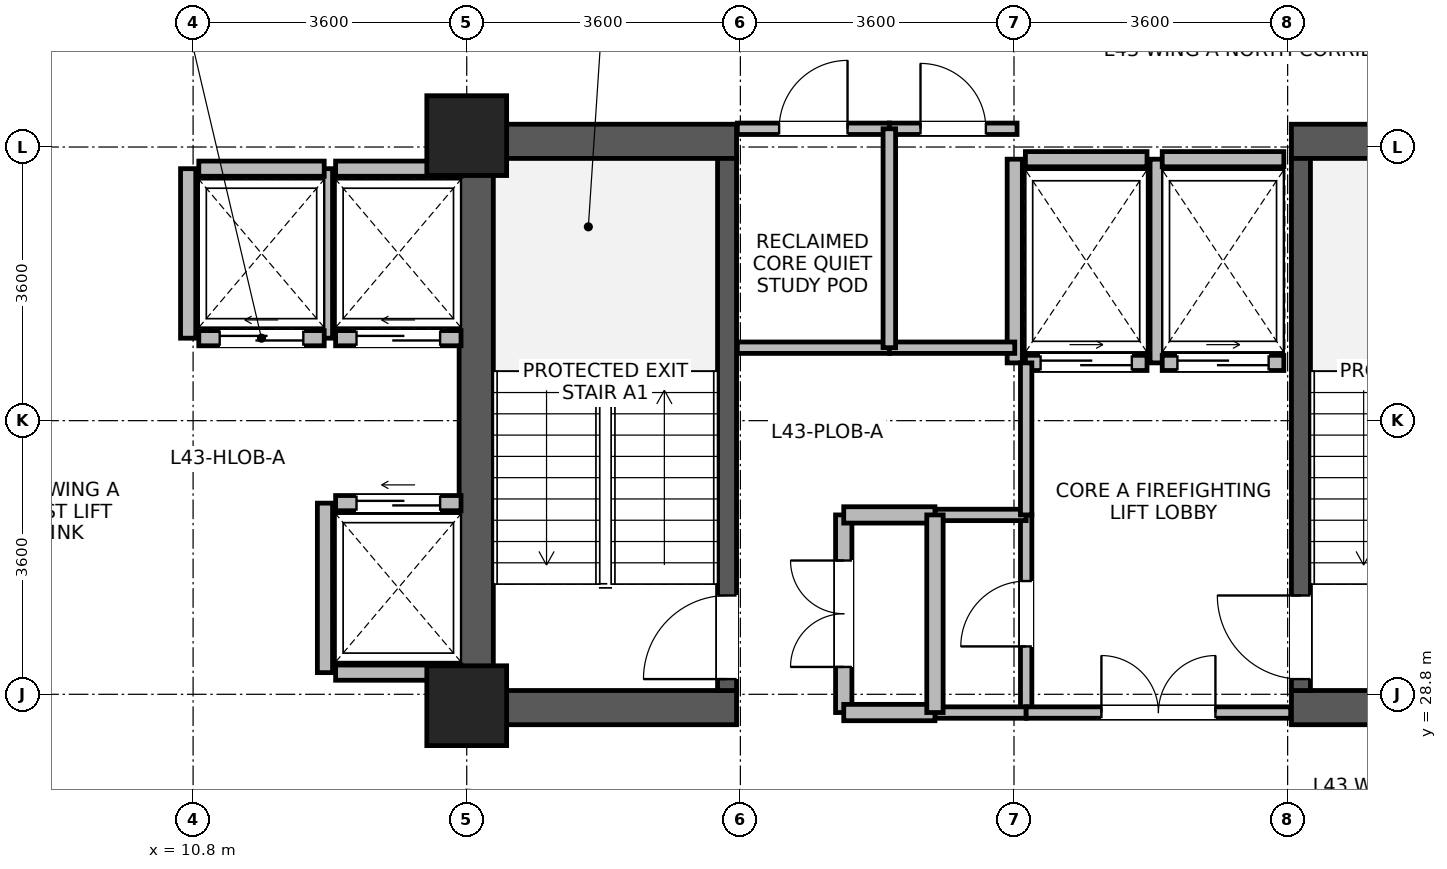
"""IFC4 building model, lengths in metres.
Left out: names, types, materials, properties, quantities, classifications, styles, units other than length and angle.
Written with IfcOpenShell. Run it as: python <this file> out.ifc"""

import sys

from ifc_helpers import new_model, si_unit, direction, frame, frame_2d, origin, origin_2d, place, context, subcontext, project, spatial, rectangle, extrude, source, transform, mapped, element, fill, save


model = new_model("IFC4")
c1 = context("Model", 3, precision=1e-05, world=origin(), true_north=direction((0.0, 1.0)))
c2 = subcontext(c1, "Body", "Model", "MODEL_VIEW")
j1 = project(units=[si_unit("LENGTHUNIT", "METRE"), si_unit("PLANEANGLEUNIT", "RADIAN")], contexts=[c1])
p1 = place(None, origin())
s1 = spatial("IfcSite", under=j1, at=p1, CompositionType="ELEMENT")
p2 = place(p1, origin())
s2 = spatial("IfcBuilding", under=s1, at=p2, CompositionType="ELEMENT")
p3 = place(p2, frame((0.0, 0.0, 169.8)))
s3 = spatial("IfcBuildingStorey", under=s2, at=p3, CompositionType="ELEMENT", Elevation=169.8)
p4 = place(p3, frame((14.525, 28.4, 0.0), z_axis=(0.0, 0.0, 1.0), x_axis=(0.0, 1.0, 0.0)))
e1 = element("IfcWall", 1, at=p4, inside=s3, PredefinedType="SHEAR", context=c2, shape_type="SweptSolid", body=[
    extrude(rectangle(XDim=7.9, YDim=0.45, at=frame_2d((3.95, 0.0))), origin(), (0.0, 0.0, 1.0), 3.46),
])
for number, where, z_axis, x_axis in (
    (2, (14.75, 28.625, 0.0), (0.0, 0.0, 1.0), (1.0, 0.0, 0.0)),
    (3, (25.25, 28.625, 0.0), (0.0, 0.0, 1.0), (1.0, 0.0, 0.0)),
    (4, (14.75, 36.075, 0.0), (0.0, 0.0, 1.0), (1.0, 0.0, 0.0)),
    (5, (25.25, 36.075, 0.0), (0.0, 0.0, 1.0), (1.0, 0.0, 0.0)),
):
    element("IfcWall", number, at=place(p3, frame(where, z_axis=z_axis, x_axis=x_axis)), inside=s3, PredefinedType="SHEAR", context=c2, shape_type="SweptSolid", body=[
        extrude(rectangle(XDim=3.2, YDim=0.45, at=frame_2d((1.6, 0.0))), origin(), (0.0, 0.0, 1.0), 3.46),
    ])
p5 = place(p3, frame((17.825, 28.85, 0.0), z_axis=(0.0, 0.0, 1.0), x_axis=(0.0, 1.0, 0.0)))
e6 = element("IfcWall", 6, at=p5, inside=s3, PredefinedType="SHEAR", context=c2, shape_type="SweptSolid", body=[
    extrude(rectangle(XDim=7.0, YDim=0.25, at=frame_2d((3.5, 0.0))), origin(), (0.0, 0.0, 1.0), 3.46),
])
p6 = place(p5, frame((0.15, 0.0, 0.0)))
e7 = element("IfcOpeningElement", 7, at=p6, cuts=e6, PredefinedType="OPENING", context=c2, shape_type="SweptSolid", body=[
    extrude(rectangle(XDim=1.1, YDim=2.08, at=frame_2d((0.55, 1.04))), frame((0.0, 0.135, 0.0), z_axis=(0.0, -1.0, 0.0), x_axis=(1.0, 0.0, 0.0)), (0.0, 0.0, 1.0), 0.27),
])
p7 = place(p3, frame((25.375, 28.85, 0.0), z_axis=(0.0, 0.0, 1.0), x_axis=(0.0, 1.0, 0.0)))
e8 = element("IfcWall", 8, at=p7, inside=s3, PredefinedType="SHEAR", context=c2, shape_type="SweptSolid", body=[
    extrude(rectangle(XDim=7.0, YDim=0.25, at=frame_2d((3.5, 0.0))), origin(), (0.0, 0.0, 1.0), 3.46),
])
p8 = place(p7, frame((0.15, 0.0, 0.0)))
e9 = element("IfcOpeningElement", 9, at=p8, cuts=e8, PredefinedType="OPENING", context=c2, shape_type="SweptSolid", body=[
    extrude(rectangle(XDim=1.1, YDim=2.08, at=frame_2d((0.55, 1.04))), frame((0.0, 0.135, 0.0), z_axis=(0.0, -1.0, 0.0), x_axis=(1.0, 0.0, 0.0)), (0.0, 0.0, 1.0), 0.27),
])
m1 = source(origin(), c2, "Body", "SweptSolid", [
    extrude(rectangle(XDim=1.05, YDim=1.05, at=origin_2d()), origin(), (0.0, 0.0, 1.0), 3.7),
])
for number, where, z_axis, x_axis in (
    (10, (14.4, 28.65, 0.0), (0.0, 0.0, 1.0), (1.0, 0.0, 0.0)),
    (11, (14.4, 36.15, 0.0), (0.0, 0.0, 1.0), (1.0, 0.0, 0.0)),
):
    element("IfcColumn", number, at=place(p3, frame(where, z_axis=z_axis, x_axis=x_axis)), inside=s3, PredefinedType="COLUMN", context=c2, shape_type="MappedRepresentation", body=[
        mapped(m1, transform((0.0, 0.0, 0.0), x_axis=(1.0, 0.0, 0.0), y_axis=(0.0, 1.0, 0.0), z_axis=(0.0, 0.0, 1.0), scale=1.0)),
    ])
p9 = place(p3, frame((12.675, 33.485, 0.0), z_axis=(0.0, 0.0, 1.0), x_axis=(1.0, 0.0, 0.0)))
e12 = element("IfcWall", 12, at=p9, inside=s3, PredefinedType="PARTITIONING", context=c2, shape_type="SweptSolid", body=[
    extrude(rectangle(XDim=1.65, YDim=0.2, at=frame_2d((0.825, 0.0))), origin(), (0.0, 0.0, 1.0), 3.44),
])
p10 = place(p9, frame((0.275, 0.0, 0.0)))
e13 = element("IfcOpeningElement", 13, at=p10, cuts=e12, PredefinedType="OPENING", context=c2, shape_type="SweptSolid", body=[
    extrude(rectangle(XDim=1.1, YDim=2.12, at=frame_2d((0.55, 1.06))), frame((0.0, 0.11, 0.0), z_axis=(0.0, -1.0, 0.0), x_axis=(1.0, 0.0, 0.0)), (0.0, 0.0, 1.0), 0.22),
])
p11 = place(p3, frame((12.675, 35.715, 0.0), z_axis=(0.0, 0.0, 1.0), x_axis=(1.0, 0.0, 0.0)))
e14 = element("IfcWall", 14, at=p11, inside=s3, PredefinedType="PARTITIONING", context=c2, shape_type="SweptSolid", body=[
    extrude(rectangle(XDim=1.65, YDim=0.2, at=frame_2d((0.825, 0.0))), origin(), (0.0, 0.0, 1.0), 3.44),
])
p12 = place(p3, frame((12.535, 33.485, 0.0), z_axis=(0.0, 0.0, 1.0), x_axis=(0.0, 1.0, 0.0)))
e15 = element("IfcWall", 15, at=p12, inside=s3, PredefinedType="PARTITIONING", context=c2, shape_type="SweptSolid", body=[
    extrude(rectangle(XDim=2.23, YDim=0.2, at=frame_2d((1.115, 0.0))), origin(), (0.0, 0.0, 1.0), 3.44),
])
p13 = place(p3, frame((12.675, 29.085, 0.0), z_axis=(0.0, 0.0, 1.0), x_axis=(1.0, 0.0, 0.0)))
e16 = element("IfcWall", 16, at=p13, inside=s3, PredefinedType="PARTITIONING", context=c2, shape_type="SweptSolid", body=[
    extrude(rectangle(XDim=1.65, YDim=0.2, at=frame_2d((0.825, 0.0))), origin(), (0.0, 0.0, 1.0), 3.44),
])
p14 = place(p3, frame((12.675, 31.315, 0.0), z_axis=(0.0, 0.0, 1.0), x_axis=(1.0, 0.0, 0.0)))
e17 = element("IfcWall", 17, at=p14, inside=s3, PredefinedType="PARTITIONING", context=c2, shape_type="SweptSolid", body=[
    extrude(rectangle(XDim=1.65, YDim=0.2, at=frame_2d((0.825, 0.0))), origin(), (0.0, 0.0, 1.0), 3.44),
])
p15 = place(p14, frame((0.275, 0.0, 0.0)))
e18 = element("IfcOpeningElement", 18, at=p15, cuts=e17, PredefinedType="OPENING", context=c2, shape_type="SweptSolid", body=[
    extrude(rectangle(XDim=1.1, YDim=2.12, at=frame_2d((0.55, 1.06))), frame((0.0, 0.11, 0.0), z_axis=(0.0, -1.0, 0.0), x_axis=(1.0, 0.0, 0.0)), (0.0, 0.0, 1.0), 0.22),
])
p16 = place(p3, frame((12.535, 29.085, 0.0), z_axis=(0.0, 0.0, 1.0), x_axis=(0.0, 1.0, 0.0)))
e19 = element("IfcWall", 19, at=p16, inside=s3, PredefinedType="PARTITIONING", context=c2, shape_type="SweptSolid", body=[
    extrude(rectangle(XDim=2.23, YDim=0.2, at=frame_2d((1.115, 0.0))), origin(), (0.0, 0.0, 1.0), 3.44),
])
p17 = place(p3, frame((10.875, 33.485, 0.0), z_axis=(0.0, 0.0, 1.0), x_axis=(1.0, 0.0, 0.0)))
e20 = element("IfcWall", 20, at=p17, inside=s3, PredefinedType="PARTITIONING", context=c2, shape_type="SweptSolid", body=[
    extrude(rectangle(XDim=1.65, YDim=0.2, at=frame_2d((0.825, 0.0))), origin(), (0.0, 0.0, 1.0), 3.44),
])
p18 = place(p17, frame((0.275, 0.0, 0.0)))
e21 = element("IfcOpeningElement", 21, at=p18, cuts=e20, PredefinedType="OPENING", context=c2, shape_type="SweptSolid", body=[
    extrude(rectangle(XDim=1.1, YDim=2.12, at=frame_2d((0.55, 1.06))), frame((0.0, 0.11, 0.0), z_axis=(0.0, -1.0, 0.0), x_axis=(1.0, 0.0, 0.0)), (0.0, 0.0, 1.0), 0.22),
])
p19 = place(p3, frame((10.875, 35.715, 0.0), z_axis=(0.0, 0.0, 1.0), x_axis=(1.0, 0.0, 0.0)))
e22 = element("IfcWall", 22, at=p19, inside=s3, PredefinedType="PARTITIONING", context=c2, shape_type="SweptSolid", body=[
    extrude(rectangle(XDim=1.65, YDim=0.2, at=frame_2d((0.825, 0.0))), origin(), (0.0, 0.0, 1.0), 3.44),
])
p20 = place(p3, frame((10.735, 33.485, 0.0), z_axis=(0.0, 0.0, 1.0), x_axis=(0.0, 1.0, 0.0)))
e23 = element("IfcWall", 23, at=p20, inside=s3, PredefinedType="PARTITIONING", context=c2, shape_type="SweptSolid", body=[
    extrude(rectangle(XDim=2.23, YDim=0.2, at=frame_2d((1.115, 0.0))), origin(), (0.0, 0.0, 1.0), 3.44),
])
p21 = place(p3, frame((21.75, 33.16, 0.0), z_axis=(0.0, 0.0, 1.0), x_axis=(1.0, 0.0, 0.0)))
e24 = element("IfcWall", 24, at=p21, inside=s3, PredefinedType="PARTITIONING", context=c2, shape_type="SweptSolid", body=[
    extrude(rectangle(XDim=1.6, YDim=0.2, at=frame_2d((0.8, 0.0))), origin(), (0.0, 0.0, 1.0), 3.44),
])
p22 = place(p21, frame((0.2, 0.0, 0.0)))
e25 = element("IfcOpeningElement", 25, at=p22, cuts=e24, PredefinedType="OPENING", context=c2, shape_type="SweptSolid", body=[
    extrude(rectangle(XDim=1.2, YDim=2.12, at=frame_2d((0.6, 1.06))), frame((0.0, 0.11, 0.0), z_axis=(0.0, -1.0, 0.0), x_axis=(1.0, 0.0, 0.0)), (0.0, 0.0, 1.0), 0.22),
])
p23 = place(p3, frame((21.75, 35.84, 0.0), z_axis=(0.0, 0.0, 1.0), x_axis=(1.0, 0.0, 0.0)))
e26 = element("IfcWall", 26, at=p23, inside=s3, PredefinedType="PARTITIONING", context=c2, shape_type="SweptSolid", body=[
    extrude(rectangle(XDim=1.6, YDim=0.2, at=frame_2d((0.8, 0.0))), origin(), (0.0, 0.0, 1.0), 2.44),
])
for number, where, z_axis, x_axis in (
    (27, (21.61, 33.16, 0.0), (0.0, 0.0, 1.0), (0.0, 1.0, 0.0)),
    (28, (23.49, 33.16, 0.0), (0.0, 0.0, 1.0), (0.0, 1.0, 0.0)),
):
    element("IfcWall", number, at=place(p3, frame(where, z_axis=z_axis, x_axis=x_axis)), inside=s3, PredefinedType="PARTITIONING", context=c2, shape_type="SweptSolid", body=[
        extrude(rectangle(XDim=2.68, YDim=0.2, at=frame_2d((1.34, 0.0))), origin(), (0.0, 0.0, 1.0), 3.44),
    ])
p24 = place(p3, frame((23.55, 33.16, 0.0), z_axis=(0.0, 0.0, 1.0), x_axis=(1.0, 0.0, 0.0)))
e29 = element("IfcWall", 29, at=p24, inside=s3, PredefinedType="PARTITIONING", context=c2, shape_type="SweptSolid", body=[
    extrude(rectangle(XDim=1.6, YDim=0.2, at=frame_2d((0.8, 0.0))), origin(), (0.0, 0.0, 1.0), 3.44),
])
p25 = place(p24, frame((0.2, 0.0, 0.0)))
e30 = element("IfcOpeningElement", 30, at=p25, cuts=e29, PredefinedType="OPENING", context=c2, shape_type="SweptSolid", body=[
    extrude(rectangle(XDim=1.2, YDim=2.12, at=frame_2d((0.6, 1.06))), frame((0.0, 0.11, 0.0), z_axis=(0.0, -1.0, 0.0), x_axis=(1.0, 0.0, 0.0)), (0.0, 0.0, 1.0), 0.22),
])
p26 = place(p3, frame((23.55, 35.84, 0.0), z_axis=(0.0, 0.0, 1.0), x_axis=(1.0, 0.0, 0.0)))
e31 = element("IfcWall", 31, at=p26, inside=s3, PredefinedType="PARTITIONING", context=c2, shape_type="SweptSolid", body=[
    extrude(rectangle(XDim=1.6, YDim=0.2, at=frame_2d((0.8, 0.0))), origin(), (0.0, 0.0, 1.0), 2.44),
])
p27 = place(p3, frame((19.36, 28.56, 0.0), z_axis=(0.0, 0.0, 1.0), x_axis=(0.0, 1.0, 0.0)))
e32 = element("IfcWall", 32, at=p27, inside=s3, PredefinedType="PARTITIONING", context=c2, shape_type="SweptSolid", body=[
    extrude(rectangle(XDim=2.6, YDim=0.215, at=frame_2d((1.3, 0.0))), origin(), (0.0, 0.0, 1.0), 3.44),
])
p28 = place(p27, frame((0.6, 0.0, 0.0)))
e33 = element("IfcOpeningElement", 33, at=p28, cuts=e32, PredefinedType="OPENING", context=c2, shape_type="SweptSolid", body=[
    extrude(rectangle(XDim=1.4, YDim=2.15, at=frame_2d((0.7, 1.075))), frame((0.0, 0.118, 0.0), z_axis=(0.0, -1.0, 0.0), x_axis=(1.0, 0.0, 0.0)), (0.0, 0.0, 1.0), 0.235),
])
p29 = place(p3, frame((21.76, 28.56, 0.0), z_axis=(0.0, 0.0, 1.0), x_axis=(0.0, 1.0, 0.0)))
e34 = element("IfcWall", 34, at=p29, inside=s3, PredefinedType="PARTITIONING", context=c2, shape_type="SweptSolid", body=[
    extrude(rectangle(XDim=2.6, YDim=0.15, at=frame_2d((1.3, 0.0))), origin(), (0.0, 0.0, 1.0), 3.44),
])
p30 = place(p29, frame((0.87, 0.0, 0.0)))
e35 = element("IfcOpeningElement", 35, at=p30, cuts=e34, PredefinedType="OPENING", context=c2, shape_type="SweptSolid", body=[
    extrude(rectangle(XDim=0.86, YDim=2.02, at=frame_2d((0.43, 1.01))), frame((0.0, 0.085, 0.0), z_axis=(0.0, -1.0, 0.0), x_axis=(1.0, 0.0, 0.0)), (0.0, 0.0, 1.0), 0.17),
])
p31 = place(p3, frame((17.96, 33.36, 0.0), z_axis=(0.0, 0.0, 1.0), x_axis=(1.0, 0.0, 0.0)))
e36 = element("IfcWall", 36, at=p31, inside=s3, PredefinedType="PARTITIONING", context=c2, shape_type="SweptSolid", body=[
    extrude(rectangle(XDim=2.0, YDim=0.15, at=frame_2d((1.0, 0.0))), origin(), (0.0, 0.0, 1.0), 3.44),
])
p32 = place(p3, frame((17.96, 36.24, 0.0), z_axis=(0.0, 0.0, 1.0), x_axis=(1.0, 0.0, 0.0)))
e37 = element("IfcWall", 37, at=p32, inside=s3, PredefinedType="PARTITIONING", context=c2, shape_type="SweptSolid", body=[
    extrude(rectangle(XDim=2.0, YDim=0.15, at=frame_2d((1.0, 0.0))), origin(), (0.0, 0.0, 1.0), 2.44),
])
p33 = place(p32, frame((0.55, 0.0, 0.0)))
e38 = element("IfcOpeningElement", 38, at=p33, cuts=e37, PredefinedType="OPENING", context=c2, shape_type="SweptSolid", body=[
    extrude(rectangle(XDim=0.9, YDim=2.08, at=frame_2d((0.45, 1.04))), frame((0.0, 0.085, 0.0), z_axis=(0.0, -1.0, 0.0), x_axis=(1.0, 0.0, 0.0)), (0.0, 0.0, 1.0), 0.17),
])
p34 = place(p3, frame((19.96, 33.36, 0.0), z_axis=(0.0, 0.0, 1.0), x_axis=(1.0, 0.0, 0.0)))
e39 = element("IfcWall", 39, at=p34, inside=s3, PredefinedType="PARTITIONING", context=c2, shape_type="SweptSolid", body=[
    extrude(rectangle(XDim=1.65, YDim=0.15, at=frame_2d((0.825, 0.0))), origin(), (0.0, 0.0, 1.0), 3.44),
])
p35 = place(p3, frame((19.96, 36.24, 0.0), z_axis=(0.0, 0.0, 1.0), x_axis=(1.0, 0.0, 0.0)))
e40 = element("IfcWall", 40, at=p35, inside=s3, PredefinedType="PARTITIONING", context=c2, shape_type="SweptSolid", body=[
    extrude(rectangle(XDim=1.68, YDim=0.15, at=frame_2d((0.84, 0.0))), origin(), (0.0, 0.0, 1.0), 2.44),
])
p36 = place(p35, frame((0.41, 0.0, 0.0)))
e41 = element("IfcOpeningElement", 41, at=p36, cuts=e40, PredefinedType="OPENING", context=c2, shape_type="SweptSolid", body=[
    extrude(rectangle(XDim=0.86, YDim=2.02, at=frame_2d((0.43, 1.01))), frame((0.0, 0.085, 0.0), z_axis=(0.0, -1.0, 0.0), x_axis=(1.0, 0.0, 0.0)), (0.0, 0.0, 1.0), 0.17),
])
p37 = place(p3, frame((20.56, 28.56, 0.0), z_axis=(0.0, 0.0, 1.0), x_axis=(1.0, 0.0, 0.0)))
e42 = element("IfcWall", 42, at=p37, inside=s3, PredefinedType="PARTITIONING", context=c2, shape_type="SweptSolid", body=[
    extrude(rectangle(XDim=1.2, YDim=0.15, at=frame_2d((0.6, 0.0))), origin(), (0.0, 0.0, 1.0), 2.44),
])
p38 = place(p3, frame((20.56, 31.16, 0.0), z_axis=(0.0, 0.0, 1.0), x_axis=(1.0, 0.0, 0.0)))
e43 = element("IfcWall", 43, at=p38, inside=s3, PredefinedType="PARTITIONING", context=c2, shape_type="SweptSolid", body=[
    extrude(rectangle(XDim=1.2, YDim=0.15, at=frame_2d((0.6, 0.0))), origin(), (0.0, 0.0, 1.0), 3.44),
])
p39 = place(p3, frame((19.36, 28.56, 0.0), z_axis=(0.0, 0.0, 1.0), x_axis=(1.0, 0.0, 0.0)))
e44 = element("IfcWall", 44, at=p39, inside=s3, PredefinedType="PARTITIONING", context=c2, shape_type="SweptSolid", body=[
    extrude(rectangle(XDim=1.2, YDim=0.215, at=frame_2d((0.6, 0.0))), origin(), (0.0, 0.0, 1.0), 2.44),
])
p40 = place(p3, frame((19.36, 31.16, 0.0), z_axis=(0.0, 0.0, 1.0), x_axis=(1.0, 0.0, 0.0)))
e45 = element("IfcWall", 45, at=p40, inside=s3, PredefinedType="PARTITIONING", context=c2, shape_type="SweptSolid", body=[
    extrude(rectangle(XDim=1.2, YDim=0.215, at=frame_2d((0.6, 0.0))), origin(), (0.0, 0.0, 1.0), 3.44),
])
p41 = place(p3, frame((21.76, 28.56, 0.0), z_axis=(0.0, 0.0, 1.0), x_axis=(1.0, 0.0, 0.0)))
e46 = element("IfcWall", 46, at=p41, inside=s3, PredefinedType="PARTITIONING", context=c2, shape_type="SweptSolid", body=[
    extrude(rectangle(XDim=3.48, YDim=0.15, at=frame_2d((1.74, 0.0))), origin(), (0.0, 0.0, 1.0), 2.44),
])
p42 = place(p41, frame((0.99, 0.0, 0.0)))
e47 = element("IfcOpeningElement", 47, at=p42, cuts=e46, PredefinedType="OPENING", context=c2, shape_type="SweptSolid", body=[
    extrude(rectangle(XDim=1.5, YDim=2.1, at=frame_2d((0.75, 1.05))), frame((0.0, 0.085, 0.0), z_axis=(0.0, -1.0, 0.0), x_axis=(1.0, 0.0, 0.0)), (0.0, 0.0, 1.0), 0.17),
])
p43 = place(p3, frame((19.96, 33.36, 0.0), z_axis=(0.0, 0.0, 1.0), x_axis=(0.0, 1.0, 0.0)))
e48 = element("IfcWall", 48, at=p43, inside=s3, PredefinedType="PARTITIONING", context=c2, shape_type="SweptSolid", body=[
    extrude(rectangle(XDim=2.88, YDim=0.165, at=frame_2d((1.44, 0.0))), origin(), (0.0, 0.0, 1.0), 3.44),
])
p44 = place(p3, frame((20.56, 28.56, 0.0), z_axis=(0.0, 0.0, 1.0), x_axis=(0.0, 1.0, 0.0)))
e49 = element("IfcWall", 49, at=p44, inside=s3, PredefinedType="PARTITIONING", context=c2, shape_type="SweptSolid", body=[
    extrude(rectangle(XDim=2.6, YDim=0.215, at=frame_2d((1.3, 0.0))), origin(), (0.0, 0.0, 1.0), 3.44),
])
p45 = place(p3, frame((21.76, 31.16, 0.0), z_axis=(0.0, 0.0, 1.0), x_axis=(0.0, 1.0, 0.0)))
e50 = element("IfcWall", 50, at=p45, inside=s3, PredefinedType="PARTITIONING", context=c2, shape_type="SweptSolid", body=[
    extrude(rectangle(XDim=2.0, YDim=0.15, at=frame_2d((1.0, 0.0))), origin(), (0.0, 0.0, 1.0), 3.44),
])
p46 = place(p6, origin())
e51 = element("IfcDoor", 51, at=p46, inside=s3, OperationType="SINGLE_SWING_LEFT", PredefinedType="DOOR", context=c2, shape_type="SweptSolid", body=[
    extrude(rectangle(XDim=1.1, YDim=2.08, at=frame_2d((0.55, 1.04))), frame((0.0, 0.025, 0.0), z_axis=(0.0, -1.0, 0.0), x_axis=(1.0, 0.0, 0.0)), (0.0, 0.0, 1.0), 0.05),
])
fill(e7, e51)
p47 = place(p8, origin())
e52 = element("IfcDoor", 52, at=p47, inside=s3, OperationType="SINGLE_SWING_RIGHT", PredefinedType="DOOR", context=c2, shape_type="SweptSolid", body=[
    extrude(rectangle(XDim=1.1, YDim=2.08, at=frame_2d((0.55, 1.04))), frame((0.0, 0.025, 0.0), z_axis=(0.0, -1.0, 0.0), x_axis=(1.0, 0.0, 0.0)), (0.0, 0.0, 1.0), 0.05),
])
fill(e9, e52)
p48 = place(p10, origin())
e53 = element("IfcDoor", 53, at=p48, inside=s3, OperationType="SLIDING_TO_LEFT", PredefinedType="DOOR", context=c2, shape_type="SweptSolid", body=[
    extrude(rectangle(XDim=1.1, YDim=2.12, at=frame_2d((0.55, 1.06))), frame((0.0, 0.025, 0.0), z_axis=(0.0, -1.0, 0.0), x_axis=(1.0, 0.0, 0.0)), (0.0, 0.0, 1.0), 0.05),
])
fill(e13, e53)
p49 = place(p15, origin())
e54 = element("IfcDoor", 54, at=p49, inside=s3, OperationType="SLIDING_TO_LEFT", PredefinedType="DOOR", context=c2, shape_type="SweptSolid", body=[
    extrude(rectangle(XDim=1.1, YDim=2.12, at=frame_2d((0.55, 1.06))), frame((0.0, 0.025, 0.0), z_axis=(0.0, -1.0, 0.0), x_axis=(1.0, 0.0, 0.0)), (0.0, 0.0, 1.0), 0.05),
])
fill(e18, e54)
p50 = place(p18, origin())
e55 = element("IfcDoor", 55, at=p50, inside=s3, OperationType="SLIDING_TO_LEFT", PredefinedType="DOOR", context=c2, shape_type="SweptSolid", body=[
    extrude(rectangle(XDim=1.1, YDim=2.12, at=frame_2d((0.55, 1.06))), frame((0.0, 0.025, 0.0), z_axis=(0.0, -1.0, 0.0), x_axis=(1.0, 0.0, 0.0)), (0.0, 0.0, 1.0), 0.05),
])
fill(e21, e55)
p51 = place(p22, origin())
e56 = element("IfcDoor", 56, at=p51, inside=s3, OperationType="SLIDING_TO_RIGHT", PredefinedType="DOOR", context=c2, shape_type="SweptSolid", body=[
    extrude(rectangle(XDim=1.2, YDim=2.12, at=frame_2d((0.6, 1.06))), frame((0.0, 0.025, 0.0), z_axis=(0.0, -1.0, 0.0), x_axis=(1.0, 0.0, 0.0)), (0.0, 0.0, 1.0), 0.05),
])
fill(e25, e56)
p52 = place(p25, origin())
e57 = element("IfcDoor", 57, at=p52, inside=s3, OperationType="SLIDING_TO_RIGHT", PredefinedType="DOOR", context=c2, shape_type="SweptSolid", body=[
    extrude(rectangle(XDim=1.2, YDim=2.12, at=frame_2d((0.6, 1.06))), frame((0.0, 0.025, 0.0), z_axis=(0.0, -1.0, 0.0), x_axis=(1.0, 0.0, 0.0)), (0.0, 0.0, 1.0), 0.05),
])
fill(e30, e57)
p53 = place(p28, origin())
e58 = element("IfcDoor", 58, at=p53, inside=s3, OperationType="DOUBLE_DOOR_SINGLE_SWING", PredefinedType="DOOR", context=c2, shape_type="SweptSolid", body=[
    extrude(rectangle(XDim=1.4, YDim=2.15, at=frame_2d((0.7, 1.075))), frame((0.0, 0.025, 0.0), z_axis=(0.0, -1.0, 0.0), x_axis=(1.0, 0.0, 0.0)), (0.0, 0.0, 1.0), 0.05),
])
fill(e33, e58)
p54 = place(p30, origin())
e59 = element("IfcDoor", 59, at=p54, inside=s3, OperationType="SINGLE_SWING_LEFT", PredefinedType="DOOR", context=c2, shape_type="SweptSolid", body=[
    extrude(rectangle(XDim=0.86, YDim=2.02, at=frame_2d((0.43, 1.01))), frame((0.0, 0.025, 0.0), z_axis=(0.0, -1.0, 0.0), x_axis=(1.0, 0.0, 0.0)), (0.0, 0.0, 1.0), 0.05),
])
fill(e35, e59)
p55 = place(p33, origin())
e60 = element("IfcDoor", 60, at=p55, inside=s3, OperationType="SINGLE_SWING_RIGHT", PredefinedType="DOOR", context=c2, shape_type="SweptSolid", body=[
    extrude(rectangle(XDim=0.9, YDim=2.08, at=frame_2d((0.45, 1.04))), frame((0.0, 0.025, 0.0), z_axis=(0.0, -1.0, 0.0), x_axis=(1.0, 0.0, 0.0)), (0.0, 0.0, 1.0), 0.05),
])
fill(e38, e60)
p56 = place(p36, origin())
e61 = element("IfcDoor", 61, at=p56, inside=s3, OperationType="SINGLE_SWING_LEFT", PredefinedType="DOOR", context=c2, shape_type="SweptSolid", body=[
    extrude(rectangle(XDim=0.86, YDim=2.02, at=frame_2d((0.43, 1.01))), frame((0.0, 0.025, 0.0), z_axis=(0.0, -1.0, 0.0), x_axis=(1.0, 0.0, 0.0)), (0.0, 0.0, 1.0), 0.05),
])
fill(e41, e61)
p57 = place(p42, origin())
e62 = element("IfcDoor", 62, at=p57, inside=s3, OperationType="DOUBLE_DOOR_SINGLE_SWING", PredefinedType="DOOR", context=c2, shape_type="SweptSolid", body=[
    extrude(rectangle(XDim=1.5, YDim=2.1, at=frame_2d((0.75, 1.05))), frame((0.0, 0.025, 0.0), z_axis=(0.0, -1.0, 0.0), x_axis=(1.0, 0.0, 0.0)), (0.0, 0.0, 1.0), 0.05),
])
fill(e47, e62)
save(model, sys.argv[1])
